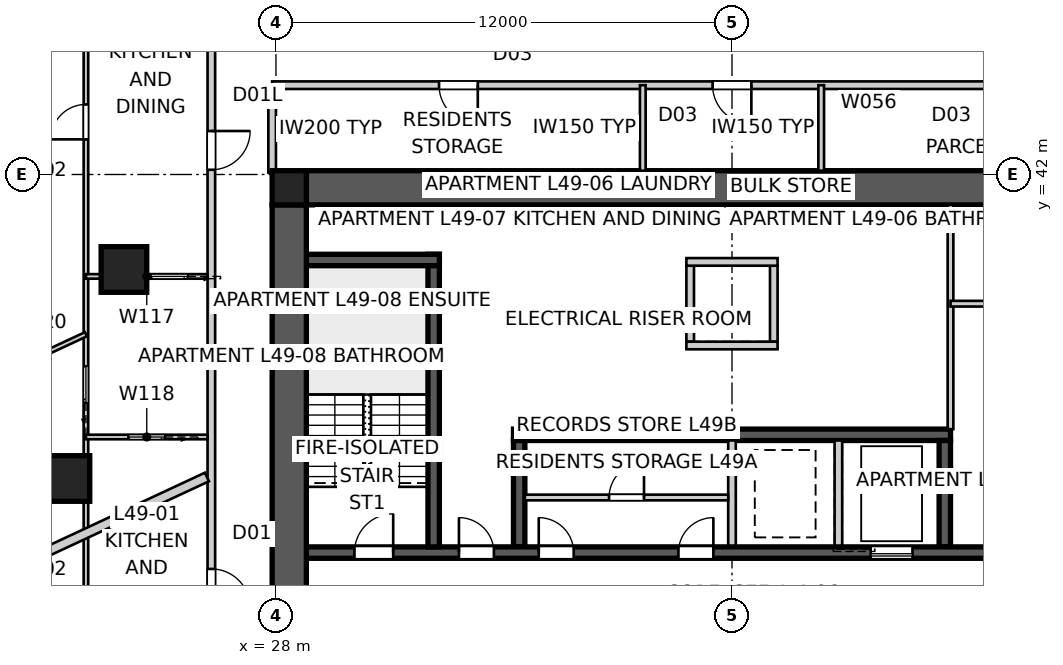
"""IFC4 building model, lengths in metres.
Left out: names, types, materials, properties, quantities, classifications, styles, units other than length and angle.
Written with IfcOpenShell. Run it as: python <this file> out.ifc"""

import sys

from ifc_helpers import new_model, si_unit, direction, frame, frame_2d, origin, origin_2d, place, context, subcontext, project, spatial, polyline, rectangle, outline, extrude, element, fill, save


model = new_model("IFC4")
c1 = context("Model", 3, precision=1e-05, world=origin(), true_north=direction((0.0, 1.0)))
c2 = subcontext(c1, "Body", "Model", "MODEL_VIEW")
j1 = project(units=[si_unit("LENGTHUNIT", "METRE"), si_unit("PLANEANGLEUNIT", "RADIAN")], contexts=[c1])
p1 = place(None, origin())
s1 = spatial("IfcSite", under=j1, at=p1, CompositionType="ELEMENT")
p2 = place(p1, origin())
s2 = spatial("IfcBuilding", under=s1, at=p2, CompositionType="ELEMENT")
p3 = place(p2, frame((0.0, 0.0, 179.4)))
s3 = spatial("IfcBuildingStorey", under=s2, at=p3, CompositionType="ELEMENT", Elevation=179.4)
p4 = place(p3, frame((28.8, 41.65, 0.0), z_axis=(0.0, 0.0, 1.0), x_axis=(1.0, 0.0, 0.0)))
e1 = element("IfcWall", 1, at=p4, inside=s3, PredefinedType="SHEAR", context=c2, shape_type="SweptSolid", body=[
    extrude(outline(polyline([(0.0, -0.45), (22.4, -0.45), (22.4, -0.025), (22.85, -0.025), (22.85, 0.025), (22.4, 0.025), (22.4, 0.45), (0.0, 0.45), (0.0, 0.025), (-0.45, 0.025), (-0.45, -0.025), (0.0, -0.025), (0.0, -0.45)])), origin(), (0.0, 0.0, 1.0), 3.4),
])
p5 = place(p3, frame((28.35, 41.2, 0.0), z_axis=(0.0, 0.0, 1.0), x_axis=(0.0, -1.0, 0.0)))
e2 = element("IfcWall", 2, at=p5, inside=s3, PredefinedType="SHEAR", context=c2, shape_type="SweptSolid", body=[
    extrude(outline(polyline([(0.0, -0.45), (22.4, -0.45), (22.4, -0.025), (22.85, -0.025), (22.85, 0.025), (22.4, 0.025), (22.4, 0.45), (0.0, 0.45), (0.0, 0.025), (-0.45, 0.025), (-0.45, -0.025), (0.0, -0.025), (0.0, -0.45)])), origin(), (0.0, 0.0, 1.0), 3.4),
])
p6 = place(p5, frame((11.14, 0.0, 0.0)))
e3 = element("IfcOpeningElement", 3, at=p6, cuts=e2, PredefinedType="OPENING", context=c2, shape_type="SweptSolid", body=[
    extrude(rectangle(XDim=1.02, YDim=2.4, at=frame_2d((0.51, 1.2))), frame((0.0, 0.46, 0.0), z_axis=(0.0, -1.0, 0.0), x_axis=(1.0, 0.0, 0.0)), (0.0, 0.0, 1.0), 0.92),
])
p7 = place(p3, frame((28.8, 32.05, 0.0), z_axis=(0.0, 0.0, 1.0), x_axis=(1.0, 0.0, 0.0)))
e4 = element("IfcWall", 4, at=p7, inside=s3, PredefinedType="SHEAR", context=c2, shape_type="SweptSolid", body=[
    extrude(rectangle(XDim=22.4, YDim=0.3, at=frame_2d((11.2, 0.0))), origin(), (0.0, 0.0, 1.0), 3.4),
])
p8 = place(p7, frame((19.04, 0.0, 0.0)))
e5 = element("IfcOpeningElement", 5, at=p8, cuts=e4, PredefinedType="OPENING", context=c2, shape_type="SweptSolid", body=[
    extrude(rectangle(XDim=0.92, YDim=2.1, at=frame_2d((0.46, 1.05))), frame((0.0, 0.16, 0.0), z_axis=(0.0, -1.0, 0.0), x_axis=(1.0, 0.0, 0.0)), (0.0, 0.0, 1.0), 0.32),
])
p9 = place(p7, frame((1.265, 0.0, 0.0)))
e6 = element("IfcOpeningElement", 6, at=p9, cuts=e4, PredefinedType="OPENING", context=c2, shape_type="SweptSolid", body=[
    extrude(rectangle(XDim=1.02, YDim=2.1, at=frame_2d((0.51, 1.05))), frame((0.0, 0.16, 0.0), z_axis=(0.0, -1.0, 0.0), x_axis=(1.0, 0.0, 0.0)), (0.0, 0.0, 1.0), 0.32),
])
p10 = place(p7, frame((4.015, 0.0, 0.0)))
e7 = element("IfcOpeningElement", 7, at=p10, cuts=e4, PredefinedType="OPENING", context=c2, shape_type="SweptSolid", body=[
    extrude(rectangle(XDim=0.92, YDim=2.1, at=frame_2d((0.46, 1.05))), frame((0.0, 0.16, 0.0), z_axis=(0.0, -1.0, 0.0), x_axis=(1.0, 0.0, 0.0)), (0.0, 0.0, 1.0), 0.32),
])
p11 = place(p7, frame((6.115, 0.0, 0.0)))
e8 = element("IfcOpeningElement", 8, at=p11, cuts=e4, PredefinedType="OPENING", context=c2, shape_type="SweptSolid", body=[
    extrude(rectangle(XDim=0.92, YDim=2.1, at=frame_2d((0.46, 1.05))), frame((0.0, 0.16, 0.0), z_axis=(0.0, -1.0, 0.0), x_axis=(1.0, 0.0, 0.0)), (0.0, 0.0, 1.0), 0.32),
])
p12 = place(p7, frame((9.79, 0.0, 0.0)))
e9 = element("IfcOpeningElement", 9, at=p12, cuts=e4, PredefinedType="OPENING", context=c2, shape_type="SweptSolid", body=[
    extrude(rectangle(XDim=0.92, YDim=2.1, at=frame_2d((0.46, 1.05))), frame((0.0, 0.16, 0.0), z_axis=(0.0, -1.0, 0.0), x_axis=(1.0, 0.0, 0.0)), (0.0, 0.0, 1.0), 0.32),
])
p13 = place(p7, frame((14.85, 0.0, 0.0)))
e10 = element("IfcOpeningElement", 10, at=p13, cuts=e4, PredefinedType="OPENING", context=c2, shape_type="SweptSolid", body=[
    extrude(rectangle(XDim=1.1, YDim=2.1, at=frame_2d((0.55, 1.05))), frame((0.0, 0.16, 0.0), z_axis=(0.0, -1.0, 0.0), x_axis=(1.0, 0.0, 0.0)), (0.0, 0.0, 1.0), 0.32),
])
p14 = place(p3, frame((34.25, 35.15, 0.0), z_axis=(0.0, 0.0, 1.0), x_axis=(1.0, 0.0, 0.0)))
e11 = element("IfcWall", 11, at=p14, inside=s3, PredefinedType="SHEAR", context=c2, shape_type="SweptSolid", body=[
    extrude(rectangle(XDim=11.5, YDim=0.3, at=frame_2d((5.75, 0.0))), origin(), (0.0, 0.0, 1.0), 3.4),
])
p15 = place(p3, frame((34.4, 32.2, 0.0), z_axis=(0.0, 0.0, 1.0), x_axis=(0.0, 1.0, 0.0)))
e12 = element("IfcWall", 12, at=p15, inside=s3, PredefinedType="SHEAR", context=c2, shape_type="SweptSolid", body=[
    extrude(rectangle(XDim=2.8, YDim=0.3, at=frame_2d((1.4, 0.0))), origin(), (0.0, 0.0, 1.0), 3.4),
])
for number, where, z_axis, x_axis in (
    (13, (40.0, 32.2, 0.0), (0.0, 0.0, 1.0), (0.0, 1.0, 0.0)),
    (14, (42.8, 32.2, 0.0), (0.0, 0.0, 1.0), (0.0, 1.0, 0.0)),
):
    element("IfcWall", number, at=place(p3, frame(where, z_axis=z_axis, x_axis=x_axis)), inside=s3, PredefinedType="SOLIDWALL", context=c2, shape_type="SweptSolid", body=[
        extrude(rectangle(XDim=2.8, YDim=0.2, at=frame_2d((1.4, 0.0))), origin(), (0.0, 0.0, 1.0), 3.4),
    ])
p16 = place(p3, frame((45.6, 32.2, 0.0), z_axis=(0.0, 0.0, 1.0), x_axis=(0.0, 1.0, 0.0)))
e15 = element("IfcWall", 15, at=p16, inside=s3, PredefinedType="SHEAR", context=c2, shape_type="SweptSolid", body=[
    extrude(rectangle(XDim=2.8, YDim=0.3, at=frame_2d((1.4, 0.0))), origin(), (0.0, 0.0, 1.0), 3.4),
])
p17 = place(p3, frame((32.15, 32.2, 0.0), z_axis=(0.0, 0.0, 1.0), x_axis=(0.0, 1.0, 0.0)))
e16 = element("IfcWall", 16, at=p17, inside=s3, PredefinedType="SHEAR", context=c2, shape_type="SweptSolid", body=[
    extrude(rectangle(XDim=7.7, YDim=0.3, at=frame_2d((3.85, 0.0))), origin(), (0.0, 0.0, 1.0), 3.4),
])
p18 = place(p3, frame((28.8, 39.75, 0.0), z_axis=(0.0, 0.0, 1.0), x_axis=(1.0, 0.0, 0.0)))
e17 = element("IfcWall", 17, at=p18, inside=s3, PredefinedType="SHEAR", context=c2, shape_type="SweptSolid", body=[
    extrude(rectangle(XDim=3.5, YDim=0.3, at=frame_2d((1.75, 0.0))), origin(), (0.0, 0.0, 1.0), 3.4),
])
for number, where, z_axis, x_axis in (
    (18, (38.9, 37.6, 0.0), (0.0, 0.0, 1.0), (0.0, 1.0, 0.0)),
    (19, (41.1, 37.6, 0.0), (0.0, 0.0, 1.0), (0.0, 1.0, 0.0)),
):
    element("IfcWall", number, at=place(p3, frame(where, z_axis=z_axis, x_axis=x_axis)), inside=s3, PredefinedType="SOLIDWALL", context=c2, shape_type="SweptSolid", body=[
        extrude(rectangle(XDim=2.0, YDim=0.2, at=frame_2d((1.0, 0.0))), origin(), (0.0, 0.0, 1.0), 3.4),
    ])
for number, where, z_axis, x_axis in (
    (20, (38.8, 37.5, 0.0), (0.0, 0.0, 1.0), (1.0, 0.0, 0.0)),
    (21, (38.8, 39.7, 0.0), (0.0, 0.0, 1.0), (1.0, 0.0, 0.0)),
):
    element("IfcWall", number, at=place(p3, frame(where, z_axis=z_axis, x_axis=x_axis)), inside=s3, PredefinedType="SOLIDWALL", context=c2, shape_type="SweptSolid", body=[
        extrude(rectangle(XDim=2.4, YDim=0.2, at=frame_2d((1.2, 0.0))), origin(), (0.0, 0.0, 1.0), 3.4),
    ])
p19 = place(p3, frame((28.35, 41.65, 0.0), z_axis=(0.0, 0.0, 1.0), x_axis=(1.0, 0.0, 0.0)))
e22 = element("IfcColumn", 22, at=p19, inside=s3, PredefinedType="COLUMN", context=c2, shape_type="SweptSolid", body=[
    extrude(rectangle(XDim=0.9, YDim=0.9, at=origin_2d()), origin(), (0.0, 0.0, 1.0), 3.4),
])
for number, where, z_axis, x_axis in (
    (23, (24.0, 39.5, 0.0), (0.0, 0.0, 1.0), (1.0, 0.0, 0.0)),
    (24, (22.5, 34.0, 0.0), (0.0, 0.0, 1.0), (1.0, 0.0, 0.0)),
):
    element("IfcColumn", number, at=place(p3, frame(where, z_axis=z_axis, x_axis=x_axis)), inside=s3, PredefinedType="COLUMN", context=c2, shape_type="SweptSolid", body=[
        extrude(rectangle(XDim=1.2, YDim=1.2, at=origin_2d()), origin(), (0.0, 0.0, 1.0), 3.4),
    ])
p20 = place(p3, frame((26.3, 46.3, 0.0), z_axis=(0.0, 0.0, 1.0), x_axis=(0.0, -1.0, 0.0)))
e25 = element("IfcWall", 25, at=p20, inside=s3, PredefinedType="PARTITIONING", context=c2, shape_type="SweptSolid", body=[
    extrude(rectangle(XDim=32.6, YDim=0.2, at=frame_2d((16.3, 0.0))), origin(), (0.0, 0.0, 1.0), 3.25),
])
p21 = place(p20, frame((3.156, 0.0, 0.0)))
e26 = element("IfcOpeningElement", 26, at=p21, cuts=e25, PredefinedType="OPENING", context=c2, shape_type="SweptSolid", body=[
    extrude(rectangle(XDim=1.02, YDim=2.1, at=frame_2d((0.51, 1.05))), frame((0.0, 0.11, 0.0), z_axis=(0.0, -1.0, 0.0), x_axis=(1.0, 0.0, 0.0)), (0.0, 0.0, 1.0), 0.22),
])
p22 = place(p20, frame((14.68, 0.0, 0.0)))
e27 = element("IfcOpeningElement", 27, at=p22, cuts=e25, PredefinedType="OPENING", context=c2, shape_type="SweptSolid", body=[
    extrude(rectangle(XDim=1.02, YDim=2.34, at=frame_2d((0.51, 1.17))), frame((0.0, 0.11, 0.0), z_axis=(0.0, -1.0, 0.0), x_axis=(1.0, 0.0, 0.0)), (0.0, 0.0, 1.0), 0.22),
])
p23 = place(p20, frame((29.543, 0.0, 0.0)))
e28 = element("IfcOpeningElement", 28, at=p23, cuts=e25, PredefinedType="OPENING", context=c2, shape_type="SweptSolid", body=[
    extrude(rectangle(XDim=1.02, YDim=2.34, at=frame_2d((0.51, 1.17))), frame((0.0, 0.11, 0.0), z_axis=(0.0, -1.0, 0.0), x_axis=(1.0, 0.0, 0.0)), (0.0, 0.0, 1.0), 0.22),
])
p24 = place(p3, frame((15.14, 28.89, 0.0), z_axis=(0.0, 0.0, 1.0), x_axis=(0.906303906082, 0.422626584374, 0.0)))
e29 = element("IfcWall", 29, at=p24, inside=s3, PredefinedType="PARTITIONING", context=c2, shape_type="SweptSolid", body=[
    extrude(rectangle(XDim=12.185, YDim=0.25, at=frame_2d((6.092, 0.0))), origin(), (0.0, 0.0, 1.0), 3.25),
])
p25 = place(p3, frame((45.75, 41.2, 0.0), z_axis=(0.0, 0.0, 1.0), x_axis=(0.0, -1.0, 0.0)))
e30 = element("IfcWall", 30, at=p25, inside=s3, PredefinedType="SOLIDWALL", context=c2, shape_type="SweptSolid", body=[
    extrude(rectangle(XDim=5.9, YDim=0.15, at=frame_2d((2.95, 0.0))), origin(), (0.0, 0.0, 1.0), 3.25),
])
p26 = place(p3, frame((45.75, 38.6, 0.0), z_axis=(0.0, 0.0, 1.0), x_axis=(1.0, 0.0, 0.0)))
e31 = element("IfcWall", 31, at=p26, inside=s3, PredefinedType="SOLIDWALL", context=c2, shape_type="SweptSolid", body=[
    extrude(rectangle(XDim=5.45, YDim=0.15, at=frame_2d((2.725, 0.0))), origin(), (0.0, 0.0, 1.0), 3.25),
])
p27 = place(p26, frame((2.265, 0.0, 0.0)))
e32 = element("IfcOpeningElement", 32, at=p27, cuts=e31, PredefinedType="OPENING", context=c2, shape_type="SweptSolid", body=[
    extrude(rectangle(XDim=0.92, YDim=2.1, at=frame_2d((0.46, 1.05))), frame((0.0, 0.085, 0.0), z_axis=(0.0, -1.0, 0.0), x_axis=(1.0, 0.0, 0.0)), (0.0, 0.0, 1.0), 0.17),
])
p28 = place(p3, frame((52.1, 44.35, 0.0), z_axis=(0.0, 0.0, 1.0), x_axis=(-1.0, 0.0, 0.0)))
e33 = element("IfcWall", 33, at=p28, inside=s3, PredefinedType="PARTITIONING", context=c2, shape_type="SweptSolid", body=[
    extrude(rectangle(XDim=24.2, YDim=0.2, at=frame_2d((12.1, 0.0))), origin(), (0.0, 0.0, 1.0), 3.25),
])
p29 = place(p28, frame((18.789, 0.0, 0.0)))
e34 = element("IfcOpeningElement", 34, at=p29, cuts=e33, PredefinedType="OPENING", context=c2, shape_type="SweptSolid", body=[
    extrude(rectangle(XDim=1.02, YDim=2.1, at=frame_2d((0.51, 1.05))), frame((0.0, 0.11, 0.0), z_axis=(0.0, -1.0, 0.0), x_axis=(1.0, 0.0, 0.0)), (0.0, 0.0, 1.0), 0.22),
])
p30 = place(p28, frame((4.391, 0.0, 0.0)))
e35 = element("IfcOpeningElement", 35, at=p30, cuts=e33, PredefinedType="OPENING", context=c2, shape_type="SweptSolid", body=[
    extrude(rectangle(XDim=1.02, YDim=2.1, at=frame_2d((0.51, 1.05))), frame((0.0, 0.11, 0.0), z_axis=(0.0, -1.0, 0.0), x_axis=(1.0, 0.0, 0.0)), (0.0, 0.0, 1.0), 0.22),
])
p31 = place(p28, frame((11.59, 0.0, 0.0)))
e36 = element("IfcOpeningElement", 36, at=p31, cuts=e33, PredefinedType="OPENING", context=c2, shape_type="SweptSolid", body=[
    extrude(rectangle(XDim=1.02, YDim=2.1, at=frame_2d((0.51, 1.05))), frame((0.0, 0.11, 0.0), z_axis=(0.0, -1.0, 0.0), x_axis=(1.0, 0.0, 0.0)), (0.0, 0.0, 1.0), 0.22),
])
p32 = place(p3, frame((27.9, 44.35, 0.0), z_axis=(0.0, 0.0, 1.0), x_axis=(0.0, -1.0, 0.0)))
e37 = element("IfcWall", 37, at=p32, inside=s3, PredefinedType="PARTITIONING", context=c2, shape_type="SweptSolid", body=[
    extrude(rectangle(XDim=2.3, YDim=0.2, at=frame_2d((1.15, 0.0))), origin(), (0.0, 0.0, 1.0), 3.25),
])
for number, where, z_axis, x_axis in (
    (38, (37.653, 42.1, 0.0), (0.0, 0.0, 1.0), (0.0, 1.0, 0.0)),
    (39, (42.347, 42.1, 0.0), (0.0, 0.0, 1.0), (0.0, 1.0, 0.0)),
):
    element("IfcWall", number, at=place(p3, frame(where, z_axis=z_axis, x_axis=x_axis)), inside=s3, PredefinedType="SOLIDWALL", context=c2, shape_type="SweptSolid", body=[
        extrude(rectangle(XDim=2.25, YDim=0.15, at=frame_2d((1.125, 0.0))), origin(), (0.0, 0.0, 1.0), 3.25),
    ])
p33 = place(p3, frame((23.0, 16.832, 0.0), z_axis=(0.0, 0.0, 1.0), x_axis=(0.0, 1.0, 0.0)))
e40 = element("IfcWall", 40, at=p33, inside=s3, PredefinedType="PARTITIONING", context=c2, shape_type="SweptSolid", body=[
    extrude(rectangle(XDim=30.574, YDim=0.12, at=frame_2d((15.287, 0.0))), origin(), (0.0, 0.0, 1.0), 2.55),
])
p34 = place(p33, frame((26.093, 0.0, 0.0)))
e41 = element("IfcOpeningElement", 41, at=p34, cuts=e40, PredefinedType="OPENING", context=c2, shape_type="SweptSolid", body=[
    extrude(rectangle(XDim=0.92, YDim=2.34, at=frame_2d((0.46, 1.17))), frame((0.0, 0.07, 0.0), z_axis=(0.0, -1.0, 0.0), x_axis=(1.0, 0.0, 0.0)), (0.0, 0.0, 1.0), 0.14),
])
p35 = place(p33, frame((13.012, 0.0, 0.0)))
e42 = element("IfcOpeningElement", 42, at=p35, cuts=e40, PredefinedType="OPENING", context=c2, shape_type="SweptSolid", body=[
    extrude(rectangle(XDim=0.92, YDim=2.34, at=frame_2d((0.46, 1.17))), frame((0.0, 0.07, 0.0), z_axis=(0.0, -1.0, 0.0), x_axis=(1.0, 0.0, 0.0)), (0.0, 0.0, 1.0), 0.14),
])
p36 = place(p33, frame((19.16, 0.0, 0.0)))
e43 = element("IfcOpeningElement", 43, at=p36, cuts=e40, PredefinedType="OPENING", context=c2, shape_type="SweptSolid", body=[
    extrude(rectangle(XDim=0.96, YDim=2.1, at=frame_2d((0.48, 1.05))), frame((0.0, 0.07, 0.0), z_axis=(0.0, -1.0, 0.0), x_axis=(1.0, 0.0, 0.0)), (0.0, 0.0, 1.0), 0.14),
])
p37 = place(p33, frame((2.018, 0.0, 0.0)))
e44 = element("IfcOpeningElement", 44, at=p37, cuts=e40, PredefinedType="OPENING", context=c2, shape_type="SweptSolid", body=[
    extrude(rectangle(XDim=0.96, YDim=2.1, at=frame_2d((0.48, 1.05))), frame((0.0, 0.07, 0.0), z_axis=(0.0, -1.0, 0.0), x_axis=(1.0, 0.0, 0.0)), (0.0, 0.0, 1.0), 0.14),
])
p38 = place(p3, frame((26.2, 39.318, 0.0), z_axis=(0.0, 0.0, 1.0), x_axis=(-1.0, 0.0, 0.0)))
e45 = element("IfcWall", 45, at=p38, inside=s3, PredefinedType="PARTITIONING", context=c2, shape_type="SweptSolid", body=[
    extrude(rectangle(XDim=3.2, YDim=0.12, at=frame_2d((1.6, 0.0))), origin(), (0.0, 0.0, 1.0), 3.25),
])
p39 = place(p38, frame((0.52, 0.0, 0.0)))
e46 = element("IfcOpeningElement", 46, at=p39, cuts=e45, PredefinedType="OPENING", context=c2, shape_type="SweptSolid", body=[
    extrude(rectangle(XDim=0.96, YDim=2.1, at=frame_2d((0.48, 1.05))), frame((0.0, 0.07, 0.0), z_axis=(0.0, -1.0, 0.0), x_axis=(1.0, 0.0, 0.0)), (0.0, 0.0, 1.0), 0.14),
])
p40 = place(p3, frame((26.2, 35.092, 0.0), z_axis=(0.0, 0.0, 1.0), x_axis=(-1.0, 0.0, 0.0)))
e47 = element("IfcWall", 47, at=p40, inside=s3, PredefinedType="PARTITIONING", context=c2, shape_type="SweptSolid", body=[
    extrude(rectangle(XDim=3.2, YDim=0.12, at=frame_2d((1.6, 0.0))), origin(), (0.0, 0.0, 1.0), 3.25),
])
p41 = place(p40, frame((1.12, 0.0, 0.0)))
e48 = element("IfcOpeningElement", 48, at=p41, cuts=e47, PredefinedType="OPENING", context=c2, shape_type="SweptSolid", body=[
    extrude(rectangle(XDim=0.96, YDim=2.1, at=frame_2d((0.48, 1.05))), frame((0.0, 0.07, 0.0), z_axis=(0.0, -1.0, 0.0), x_axis=(1.0, 0.0, 0.0)), (0.0, 0.0, 1.0), 0.14),
])
p42 = place(p3, frame((21.072, 36.897, 0.0), z_axis=(0.0, 0.0, 1.0), x_axis=(0.90630329877, 0.422627886727, 0.0)))
e49 = element("IfcWall", 49, at=p42, inside=s3, PredefinedType="PARTITIONING", context=c2, shape_type="SweptSolid", body=[
    extrude(rectangle(XDim=2.128, YDim=0.12, at=frame_2d((1.064, 0.0))), origin(), (0.0, 0.0, 1.0), 3.25),
])
p43 = place(p3, frame((34.55, 33.5, 0.0), z_axis=(0.0, 0.0, 1.0), x_axis=(1.0, 0.0, 0.0)))
e50 = element("IfcWall", 50, at=p43, inside=s3, PredefinedType="SOLIDWALL", context=c2, shape_type="SweptSolid", body=[
    extrude(rectangle(XDim=5.35, YDim=0.15, at=frame_2d((2.675, 0.0))), origin(), (0.0, 0.0, 1.0), 3.25),
])
p44 = place(p43, frame((2.215, 0.0, 0.0)))
e51 = element("IfcOpeningElement", 51, at=p44, cuts=e50, PredefinedType="OPENING", context=c2, shape_type="SweptSolid", body=[
    extrude(rectangle(XDim=0.92, YDim=2.1, at=frame_2d((0.46, 1.05))), frame((0.0, 0.085, 0.0), z_axis=(0.0, -1.0, 0.0), x_axis=(1.0, 0.0, 0.0)), (0.0, 0.0, 1.0), 0.17),
])
p45 = place(p9, origin())
e52 = element("IfcDoor", 52, at=p45, inside=s3, OperationType="SINGLE_SWING_RIGHT", PredefinedType="DOOR", context=c2, shape_type="SweptSolid", body=[
    extrude(rectangle(XDim=1.02, YDim=2.1, at=frame_2d((0.51, 1.05))), frame((0.0, 0.025, 0.0), z_axis=(0.0, -1.0, 0.0), x_axis=(1.0, 0.0, 0.0)), (0.0, 0.0, 1.0), 0.05),
])
fill(e6, e52)
p46 = place(p10, origin())
e53 = element("IfcDoor", 53, at=p46, inside=s3, OperationType="SINGLE_SWING_LEFT", PredefinedType="DOOR", context=c2, shape_type="SweptSolid", body=[
    extrude(rectangle(XDim=0.92, YDim=2.1, at=frame_2d((0.46, 1.05))), frame((0.0, 0.025, 0.0), z_axis=(0.0, -1.0, 0.0), x_axis=(1.0, 0.0, 0.0)), (0.0, 0.0, 1.0), 0.05),
])
fill(e7, e53)
p47 = place(p29, origin())
e54 = element("IfcDoor", 54, at=p47, inside=s3, OperationType="SINGLE_SWING_LEFT", PredefinedType="DOOR", context=c2, shape_type="SweptSolid", body=[
    extrude(rectangle(XDim=1.02, YDim=2.1, at=frame_2d((0.51, 1.05))), frame((0.0, 0.025, 0.0), z_axis=(0.0, -1.0, 0.0), x_axis=(1.0, 0.0, 0.0)), (0.0, 0.0, 1.0), 0.05),
])
fill(e34, e54)
p48 = place(p21, origin())
e55 = element("IfcDoor", 55, at=p48, inside=s3, OperationType="SINGLE_SWING_LEFT", PredefinedType="DOOR", context=c2, shape_type="SweptSolid", body=[
    extrude(rectangle(XDim=1.02, YDim=2.1, at=frame_2d((0.51, 1.05))), frame((0.0, 0.025, 0.0), z_axis=(0.0, -1.0, 0.0), x_axis=(1.0, 0.0, 0.0)), (0.0, 0.0, 1.0), 0.05),
])
fill(e26, e55)
p49 = place(p22, origin())
e56 = element("IfcDoor", 56, at=p49, inside=s3, OperationType="SINGLE_SWING_RIGHT", PredefinedType="DOOR", context=c2, shape_type="SweptSolid", body=[
    extrude(rectangle(XDim=1.02, YDim=2.34, at=frame_2d((0.51, 1.17))), frame((0.0, 0.025, 0.0), z_axis=(0.0, -1.0, 0.0), x_axis=(1.0, 0.0, 0.0)), (0.0, 0.0, 1.0), 0.05),
])
fill(e27, e56)
p50 = place(p31, origin())
e57 = element("IfcDoor", 57, at=p50, inside=s3, OperationType="SINGLE_SWING_LEFT", PredefinedType="DOOR", context=c2, shape_type="SweptSolid", body=[
    extrude(rectangle(XDim=1.02, YDim=2.1, at=frame_2d((0.51, 1.05))), frame((0.0, 0.025, 0.0), z_axis=(0.0, -1.0, 0.0), x_axis=(1.0, 0.0, 0.0)), (0.0, 0.0, 1.0), 0.05),
])
fill(e36, e57)
p51 = place(p34, origin())
e58 = element("IfcDoor", 58, at=p51, inside=s3, OperationType="SINGLE_SWING_LEFT", PredefinedType="DOOR", context=c2, shape_type="SweptSolid", body=[
    extrude(rectangle(XDim=0.92, YDim=2.34, at=frame_2d((0.46, 1.17))), frame((0.0, 0.025, 0.0), z_axis=(0.0, -1.0, 0.0), x_axis=(1.0, 0.0, 0.0)), (0.0, 0.0, 1.0), 0.05),
])
fill(e41, e58)
p52 = place(p39, origin())
e59 = element("IfcDoor", 59, at=p52, inside=s3, OperationType="SLIDING_TO_LEFT", PredefinedType="DOOR", context=c2, shape_type="SweptSolid", body=[
    extrude(rectangle(XDim=0.96, YDim=2.1, at=frame_2d((0.48, 1.05))), frame((0.0, 0.025, 0.0), z_axis=(0.0, -1.0, 0.0), x_axis=(1.0, 0.0, 0.0)), (0.0, 0.0, 1.0), 0.05),
])
fill(e46, e59)
p53 = place(p41, origin())
e60 = element("IfcDoor", 60, at=p53, inside=s3, OperationType="SLIDING_TO_LEFT", PredefinedType="DOOR", context=c2, shape_type="SweptSolid", body=[
    extrude(rectangle(XDim=0.96, YDim=2.1, at=frame_2d((0.48, 1.05))), frame((0.0, 0.025, 0.0), z_axis=(0.0, -1.0, 0.0), x_axis=(1.0, 0.0, 0.0)), (0.0, 0.0, 1.0), 0.05),
])
fill(e48, e60)
p54 = place(p36, origin())
e61 = element("IfcDoor", 61, at=p54, inside=s3, OperationType="SLIDING_TO_LEFT", PredefinedType="DOOR", context=c2, shape_type="SweptSolid", body=[
    extrude(rectangle(XDim=0.96, YDim=2.1, at=frame_2d((0.48, 1.05))), frame((0.0, 0.025, 0.0), z_axis=(0.0, -1.0, 0.0), x_axis=(1.0, 0.0, 0.0)), (0.0, 0.0, 1.0), 0.05),
])
fill(e43, e61)
p55 = place(p11, origin())
e62 = element("IfcDoor", 62, at=p55, inside=s3, OperationType="SINGLE_SWING_LEFT", PredefinedType="DOOR", context=c2, shape_type="SweptSolid", body=[
    extrude(rectangle(XDim=0.92, YDim=2.1, at=frame_2d((0.46, 1.05))), frame((0.0, 0.025, 0.0), z_axis=(0.0, -1.0, 0.0), x_axis=(1.0, 0.0, 0.0)), (0.0, 0.0, 1.0), 0.05),
])
fill(e8, e62)
p56 = place(p12, origin())
e63 = element("IfcDoor", 63, at=p56, inside=s3, OperationType="SINGLE_SWING_RIGHT", PredefinedType="DOOR", context=c2, shape_type="SweptSolid", body=[
    extrude(rectangle(XDim=0.92, YDim=2.1, at=frame_2d((0.46, 1.05))), frame((0.0, 0.025, 0.0), z_axis=(0.0, -1.0, 0.0), x_axis=(1.0, 0.0, 0.0)), (0.0, 0.0, 1.0), 0.05),
])
fill(e9, e63)
p57 = place(p44, origin())
e64 = element("IfcDoor", 64, at=p57, inside=s3, OperationType="SINGLE_SWING_RIGHT", PredefinedType="DOOR", context=c2, shape_type="SweptSolid", body=[
    extrude(rectangle(XDim=0.92, YDim=2.1, at=frame_2d((0.46, 1.05))), frame((0.0, 0.025, 0.0), z_axis=(0.0, -1.0, 0.0), x_axis=(1.0, 0.0, 0.0)), (0.0, 0.0, 1.0), 0.05),
])
fill(e51, e64)
p58 = place(p13, origin())
e65 = element("IfcDoor", 65, at=p58, inside=s3, OperationType="SLIDING_TO_LEFT", PredefinedType="DOOR", context=c2, shape_type="SweptSolid", body=[
    extrude(rectangle(XDim=1.1, YDim=2.1, at=frame_2d((0.55, 1.05))), frame((0.0, 0.025, 0.0), z_axis=(0.0, -1.0, 0.0), x_axis=(1.0, 0.0, 0.0)), (0.0, 0.0, 1.0), 0.05),
])
fill(e10, e65)
save(model, sys.argv[1])
